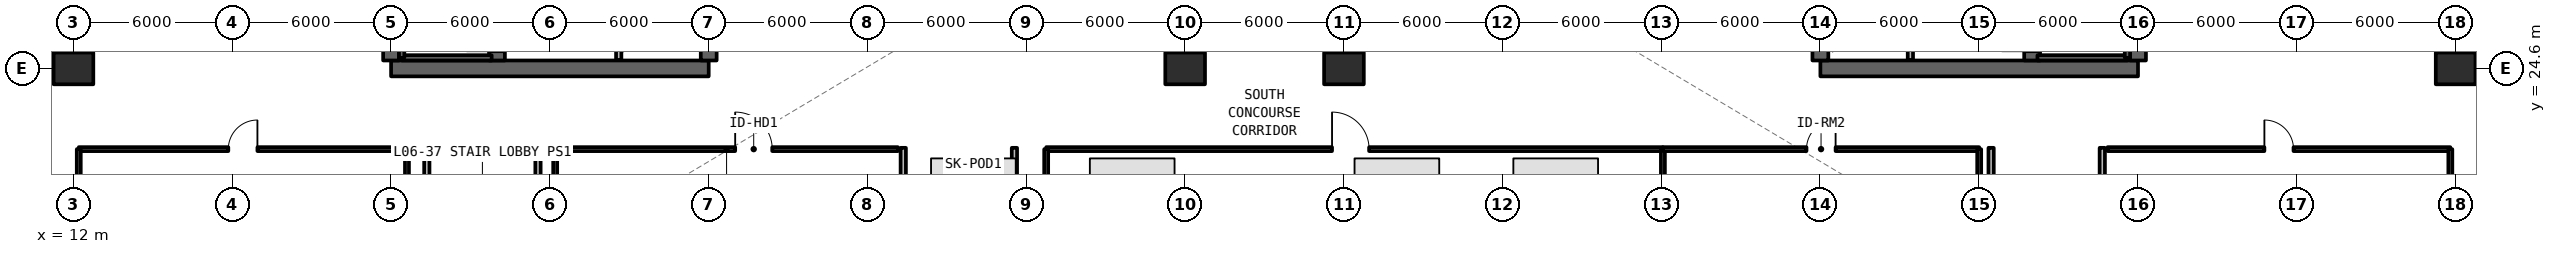
"""IFC4 building model, lengths in metres.
Left out: names, types, materials, properties, quantities, classifications, styles, units other than length and angle.
Written with IfcOpenShell. Run it as: python <this file> out.ifc"""

import sys

from ifc_helpers import new_model, si_unit, direction, frame, frame_2d, origin, origin_2d, place, context, subcontext, project, spatial, rectangle, extrude, element, fill, save


model = new_model("IFC4")
c1 = context("Model", 3, precision=1e-05, world=origin(), true_north=direction((0.0, 1.0)))
c2 = subcontext(c1, "Body", "Model", "MODEL_VIEW")
j1 = project(units=[si_unit("LENGTHUNIT", "METRE"), si_unit("PLANEANGLEUNIT", "RADIAN")], contexts=[c1])
p1 = place(None, origin())
s1 = spatial("IfcSite", under=j1, at=p1, CompositionType="ELEMENT")
p2 = place(p1, origin())
s2 = spatial("IfcBuilding", under=s1, at=p2, CompositionType="ELEMENT")
p3 = place(p2, frame((0.0, 0.0, 24.09)))
s3 = spatial("IfcBuildingStorey", under=s2, at=p3, CompositionType="ELEMENT", Elevation=24.09)
p4 = place(p3, frame((24.0, 24.6, 0.0), z_axis=(0.0, 0.0, 1.0), x_axis=(1.0, 0.0, 0.0)))
e1 = element("IfcWall", 1, at=p4, inside=s3, PredefinedType="SHEAR", context=c2, shape_type="SweptSolid", body=[
    extrude(rectangle(XDim=12.0, YDim=0.6, at=frame_2d((6.0, 0.0))), origin(), (0.0, 0.0, 1.0), 4.95),
])
p5 = place(p3, frame((24.0, 24.9, 0.0), z_axis=(0.0, 0.0, 1.0), x_axis=(0.0, 1.0, 0.0)))
e2 = element("IfcWall", 2, at=p5, inside=s3, PredefinedType="SHEAR", context=c2, shape_type="SweptSolid", body=[
    extrude(rectangle(XDim=17.4, YDim=0.6, at=frame_2d((8.7, 0.0))), origin(), (0.0, 0.0, 1.0), 4.95),
])
p6 = place(p3, frame((36.0, 24.9, 0.0), z_axis=(0.0, 0.0, 1.0), x_axis=(0.0, 1.0, 0.0)))
e3 = element("IfcWall", 3, at=p6, inside=s3, PredefinedType="SHEAR", context=c2, shape_type="SweptSolid", body=[
    extrude(rectangle(XDim=8.9, YDim=0.6, at=frame_2d((4.45, 0.0))), origin(), (0.0, 0.0, 1.0), 4.95),
])
p7 = place(p3, frame((28.0, 24.9, 0.0), z_axis=(0.0, 0.0, 1.0), x_axis=(0.0, 1.0, 0.0)))
e4 = element("IfcWall", 4, at=p7, inside=s3, PredefinedType="SHEAR", context=c2, shape_type="SweptSolid", body=[
    extrude(rectangle(XDim=17.4, YDim=0.6, at=frame_2d((8.7, 0.0))), origin(), (0.0, 0.0, 1.0), 4.95),
])
p8 = place(p7, frame((0.35, 0.0, 0.0)))
e5 = element("IfcOpeningElement", 5, at=p8, cuts=e4, PredefinedType="OPENING", context=c2, shape_type="SweptSolid", body=[
    extrude(rectangle(XDim=1.15, YDim=2.15, at=frame_2d((0.575, 1.075))), frame((0.0, 0.31, 0.0), z_axis=(0.0, -1.0, 0.0), x_axis=(1.0, 0.0, 0.0)), (0.0, 0.0, 1.0), 0.62),
])
p9 = place(p7, frame((9.55, 0.0, 0.0)))
e6 = element("IfcOpeningElement", 6, at=p9, cuts=e4, PredefinedType="OPENING", context=c2, shape_type="SweptSolid", body=[
    extrude(rectangle(XDim=1.15, YDim=2.15, at=frame_2d((0.575, 1.075))), frame((0.0, 0.31, 0.0), z_axis=(0.0, -1.0, 0.0), x_axis=(1.0, 0.0, 0.0)), (0.0, 0.0, 1.0), 0.62),
])
p10 = place(p3, frame((78.0, 24.6, 0.0), z_axis=(0.0, 0.0, 1.0), x_axis=(1.0, 0.0, 0.0)))
e7 = element("IfcWall", 7, at=p10, inside=s3, PredefinedType="SHEAR", context=c2, shape_type="SweptSolid", body=[
    extrude(rectangle(XDim=12.0, YDim=0.6, at=frame_2d((6.0, 0.0))), origin(), (0.0, 0.0, 1.0), 4.95),
])
p11 = place(p3, frame((90.0, 24.9, 0.0), z_axis=(0.0, 0.0, 1.0), x_axis=(0.0, 1.0, 0.0)))
e8 = element("IfcWall", 8, at=p11, inside=s3, PredefinedType="SHEAR", context=c2, shape_type="SweptSolid", body=[
    extrude(rectangle(XDim=17.4, YDim=0.6, at=frame_2d((8.7, 0.0))), origin(), (0.0, 0.0, 1.0), 4.95),
])
p12 = place(p3, frame((78.0, 24.9, 0.0), z_axis=(0.0, 0.0, 1.0), x_axis=(0.0, 1.0, 0.0)))
e9 = element("IfcWall", 9, at=p12, inside=s3, PredefinedType="SHEAR", context=c2, shape_type="SweptSolid", body=[
    extrude(rectangle(XDim=8.9, YDim=0.6, at=frame_2d((4.45, 0.0))), origin(), (0.0, 0.0, 1.0), 4.95),
])
p13 = place(p3, frame((86.0, 24.9, 0.0), z_axis=(0.0, 0.0, 1.0), x_axis=(0.0, 1.0, 0.0)))
e10 = element("IfcWall", 10, at=p13, inside=s3, PredefinedType="SHEAR", context=c2, shape_type="SweptSolid", body=[
    extrude(rectangle(XDim=17.4, YDim=0.6, at=frame_2d((8.7, 0.0))), origin(), (0.0, 0.0, 1.0), 4.95),
])
p14 = place(p13, frame((0.35, 0.0, 0.0)))
e11 = element("IfcOpeningElement", 11, at=p14, cuts=e10, PredefinedType="OPENING", context=c2, shape_type="SweptSolid", body=[
    extrude(rectangle(XDim=1.15, YDim=2.15, at=frame_2d((0.575, 1.075))), frame((0.0, 0.31, 0.0), z_axis=(0.0, -1.0, 0.0), x_axis=(1.0, 0.0, 0.0)), (0.0, 0.0, 1.0), 0.62),
])
p15 = place(p13, frame((9.55, 0.0, 0.0)))
e12 = element("IfcOpeningElement", 12, at=p15, cuts=e10, PredefinedType="OPENING", context=c2, shape_type="SweptSolid", body=[
    extrude(rectangle(XDim=1.15, YDim=2.15, at=frame_2d((0.575, 1.075))), frame((0.0, 0.31, 0.0), z_axis=(0.0, -1.0, 0.0), x_axis=(1.0, 0.0, 0.0)), (0.0, 0.0, 1.0), 0.62),
])
p16 = place(p3, frame((12.0, 24.6, 0.0), z_axis=(0.0, 0.0, 1.0), x_axis=(1.0, 0.0, 0.0)))
e13 = element("IfcColumn", 13, at=p16, inside=s3, PredefinedType="COLUMN", context=c2, shape_type="SweptSolid", body=[
    extrude(rectangle(XDim=1.5, YDim=1.2, at=origin_2d()), origin(), (0.0, 0.0, 1.0), 4.71),
])
for number, where, z_axis, x_axis in (
    (14, (54.0, 24.6, 0.0), (0.0, 0.0, 1.0), (1.0, 0.0, 0.0)),
    (15, (60.0, 24.6, 0.0), (0.0, 0.0, 1.0), (1.0, 0.0, 0.0)),
):
    element("IfcColumn", number, at=place(p3, frame(where, z_axis=z_axis, x_axis=x_axis)), inside=s3, PredefinedType="COLUMN", context=c2, shape_type="SweptSolid", body=[
        extrude(rectangle(XDim=1.5, YDim=1.2, at=origin_2d()), origin(), (0.0, 0.0, 1.0), 4.95),
    ])
p17 = place(p3, frame((102.0, 24.6, 0.0), z_axis=(0.0, 0.0, 1.0), x_axis=(1.0, 0.0, 0.0)))
e16 = element("IfcColumn", 16, at=p17, inside=s3, PredefinedType="COLUMN", context=c2, shape_type="SweptSolid", body=[
    extrude(rectangle(XDim=1.5, YDim=1.2, at=origin_2d()), origin(), (0.0, 0.0, 1.0), 4.71),
])
p18 = place(p3, frame((32.6, 24.92, 0.0), z_axis=(0.0, 0.0, 1.0), x_axis=(0.0, 1.0, 0.0)))
e17 = element("IfcWall", 17, at=p18, inside=s3, PredefinedType="SOLIDWALL", context=c2, shape_type="SweptSolid", body=[
    extrude(rectangle(XDim=3.58, YDim=0.2, at=frame_2d((1.79, 0.0))), origin(), (0.0, 0.0, 1.0), 3.93),
])
p19 = place(p18, frame((1.3, 0.0, 0.0)))
e18 = element("IfcOpeningElement", 18, at=p19, cuts=e17, PredefinedType="OPENING", context=c2, shape_type="SweptSolid", body=[
    extrude(rectangle(XDim=1.1, YDim=2.2, at=frame_2d((0.55, 1.1))), frame((0.0, 0.11, 0.0), z_axis=(0.0, -1.0, 0.0), x_axis=(1.0, 0.0, 0.0)), (0.0, 0.0, 1.0), 0.22),
])
p20 = place(p3, frame((81.4, 24.92, 0.0), z_axis=(0.0, 0.0, 1.0), x_axis=(0.0, 1.0, 0.0)))
e19 = element("IfcWall", 19, at=p20, inside=s3, PredefinedType="SOLIDWALL", context=c2, shape_type="SweptSolid", body=[
    extrude(rectangle(XDim=3.58, YDim=0.2, at=frame_2d((1.79, 0.0))), origin(), (0.0, 0.0, 1.0), 3.93),
])
p21 = place(p20, frame((1.3, 0.0, 0.0)))
e20 = element("IfcOpeningElement", 20, at=p21, cuts=e19, PredefinedType="OPENING", context=c2, shape_type="SweptSolid", body=[
    extrude(rectangle(XDim=1.1, YDim=2.2, at=frame_2d((0.55, 1.1))), frame((0.0, 0.11, 0.0), z_axis=(0.0, -1.0, 0.0), x_axis=(1.0, 0.0, 0.0)), (0.0, 0.0, 1.0), 0.22),
])
for number, where, z_axis, x_axis in (
    (21, (25.35, 17.0, 0.0), (0.0, 0.0, 1.0), (0.0, 1.0, 0.0)),
    (22, (29.55, 17.0, 0.0), (0.0, 0.0, 1.0), (0.0, 1.0, 0.0)),
    (23, (43.35, 17.0, 0.0), (0.0, 0.0, 1.0), (0.0, 1.0, 0.0)),
    (24, (47.55, 17.0, 0.0), (0.0, 0.0, 1.0), (0.0, 1.0, 0.0)),
    (25, (84.45, 17.0, 0.0), (0.0, 0.0, 1.0), (0.0, 1.0, 0.0)),
    (26, (88.65, 17.0, 0.0), (0.0, 0.0, 1.0), (0.0, 1.0, 0.0)),
):
    element("IfcWall", number, at=place(p3, frame(where, z_axis=z_axis, x_axis=x_axis)), inside=s3, PredefinedType="SOLIDWALL", context=c2, shape_type="SweptSolid", body=[
        extrude(rectangle(XDim=4.6, YDim=0.2, at=frame_2d((2.3, 0.0))), origin(), (0.0, 0.0, 1.0), 3.93),
    ])
p22 = place(p3, frame((30.2, 21.55, 0.0), z_axis=(0.0, 0.0, 1.0), x_axis=(1.0, 0.0, 0.0)))
e27 = element("IfcWall", 27, at=p22, inside=s3, PredefinedType="SOLIDWALL", context=c2, shape_type="SweptSolid", body=[
    extrude(rectangle(XDim=12.95, YDim=0.15, at=frame_2d((6.475, 0.0))), origin(), (0.0, 0.0, 1.0), 3.93),
])
p23 = place(p22, frame((6.8, 0.0, 0.0)))
e28 = element("IfcOpeningElement", 28, at=p23, cuts=e27, PredefinedType="OPENING", context=c2, shape_type="SweptSolid", body=[
    extrude(rectangle(XDim=1.4, YDim=2.15, at=frame_2d((0.7, 1.075))), frame((0.0, 0.085, 0.0), z_axis=(0.0, -1.0, 0.0), x_axis=(1.0, 0.0, 0.0)), (0.0, 0.0, 1.0), 0.17),
])
p24 = place(p3, frame((30.2, 5.28, 0.0), z_axis=(0.0, 0.0, 1.0), x_axis=(0.0, 1.0, 0.0)))
e29 = element("IfcWall", 29, at=p24, inside=s3, PredefinedType="SOLIDWALL", context=c2, shape_type="SweptSolid", body=[
    extrude(rectangle(XDim=16.27, YDim=0.15, at=frame_2d((8.135, 0.0))), origin(), (0.0, 0.0, 1.0), 3.687),
])
p25 = place(p3, frame((48.75, 21.55, 0.0), z_axis=(0.0, 0.0, 1.0), x_axis=(1.0, 0.0, 0.0)))
e30 = element("IfcWall", 30, at=p25, inside=s3, PredefinedType="SOLIDWALL", context=c2, shape_type="SweptSolid", body=[
    extrude(rectangle(XDim=23.3, YDim=0.15, at=frame_2d((11.65, 0.0))), origin(), (0.0, 0.0, 1.0), 3.93),
])
p26 = place(p25, frame((10.8, 0.0, 0.0)))
e31 = element("IfcOpeningElement", 31, at=p26, cuts=e30, PredefinedType="OPENING", context=c2, shape_type="SweptSolid", body=[
    extrude(rectangle(XDim=1.4, YDim=2.15, at=frame_2d((0.7, 1.075))), frame((0.0, 0.085, 0.0), z_axis=(0.0, -1.0, 0.0), x_axis=(1.0, 0.0, 0.0)), (0.0, 0.0, 1.0), 0.17),
])
p27 = place(p3, frame((48.75, 5.28, 0.0), z_axis=(0.0, 0.0, 1.0), x_axis=(0.0, 1.0, 0.0)))
e32 = element("IfcWall", 32, at=p27, inside=s3, PredefinedType="SOLIDWALL", context=c2, shape_type="SweptSolid", body=[
    extrude(rectangle(XDim=16.27, YDim=0.15, at=frame_2d((8.135, 0.0))), origin(), (0.0, 0.0, 1.0), 3.93),
])
p28 = place(p3, frame((72.05, 5.28, 0.0), z_axis=(0.0, 0.0, 1.0), x_axis=(0.0, 1.0, 0.0)))
e33 = element("IfcWall", 33, at=p28, inside=s3, PredefinedType="SOLIDWALL", context=c2, shape_type="SweptSolid", body=[
    extrude(rectangle(XDim=16.27, YDim=0.15, at=frame_2d((8.135, 0.0))), origin(), (0.0, 0.0, 1.0), 3.687),
])
p29 = place(p3, frame((72.05, 21.55, 0.0), z_axis=(0.0, 0.0, 1.0), x_axis=(1.0, 0.0, 0.0)))
e34 = element("IfcWall", 34, at=p29, inside=s3, PredefinedType="SOLIDWALL", context=c2, shape_type="SweptSolid", body=[
    extrude(rectangle(XDim=11.95, YDim=0.15, at=frame_2d((5.975, 0.0))), origin(), (0.0, 0.0, 1.0), 3.93),
])
p30 = place(p29, frame((5.425, 0.0, 0.0)))
e35 = element("IfcOpeningElement", 35, at=p30, cuts=e34, PredefinedType="OPENING", context=c2, shape_type="SweptSolid", body=[
    extrude(rectangle(XDim=1.1, YDim=2.15, at=frame_2d((0.55, 1.075))), frame((0.0, 0.085, 0.0), z_axis=(0.0, -1.0, 0.0), x_axis=(1.0, 0.0, 0.0)), (0.0, 0.0, 1.0), 0.17),
])
p31 = place(p3, frame((84.0, 5.28, 0.0), z_axis=(0.0, 0.0, 1.0), x_axis=(0.0, 1.0, 0.0)))
e36 = element("IfcWall", 36, at=p31, inside=s3, PredefinedType="SOLIDWALL", context=c2, shape_type="SweptSolid", body=[
    extrude(rectangle(XDim=16.27, YDim=0.15, at=frame_2d((8.135, 0.0))), origin(), (0.0, 0.0, 1.0), 3.687),
])
p32 = place(p3, frame((12.2, 21.55, 0.0), z_axis=(0.0, 0.0, 1.0), x_axis=(1.0, 0.0, 0.0)))
e37 = element("IfcWall", 37, at=p32, inside=s3, PredefinedType="SOLIDWALL", context=c2, shape_type="SweptSolid", body=[
    extrude(rectangle(XDim=12.4, YDim=0.15, at=frame_2d((6.2, 0.0))), origin(), (0.0, 0.0, 1.0), 3.93),
])
p33 = place(p32, frame((5.65, 0.0, 0.0)))
e38 = element("IfcOpeningElement", 38, at=p33, cuts=e37, PredefinedType="OPENING", context=c2, shape_type="SweptSolid", body=[
    extrude(rectangle(XDim=1.1, YDim=2.15, at=frame_2d((0.55, 1.075))), frame((0.0, 0.085, 0.0), z_axis=(0.0, -1.0, 0.0), x_axis=(1.0, 0.0, 0.0)), (0.0, 0.0, 1.0), 0.17),
])
for number, where, z_axis, x_axis in (
    (39, (12.2, 5.28, 0.0), (0.0, 0.0, 1.0), (0.0, 1.0, 0.0)),
    (40, (24.6, 5.28, 0.0), (0.0, 0.0, 1.0), (0.0, 1.0, 0.0)),
):
    element("IfcWall", number, at=place(p3, frame(where, z_axis=z_axis, x_axis=x_axis)), inside=s3, PredefinedType="SOLIDWALL", context=c2, shape_type="SweptSolid", body=[
        extrude(rectangle(XDim=16.27, YDim=0.15, at=frame_2d((8.135, 0.0))), origin(), (0.0, 0.0, 1.0), 3.93),
    ])
p34 = place(p3, frame((88.85, 21.55, 0.0), z_axis=(0.0, 0.0, 1.0), x_axis=(1.0, 0.0, 0.0)))
e41 = element("IfcWall", 41, at=p34, inside=s3, PredefinedType="SOLIDWALL", context=c2, shape_type="SweptSolid", body=[
    extrude(rectangle(XDim=12.95, YDim=0.15, at=frame_2d((6.475, 0.0))), origin(), (0.0, 0.0, 1.0), 3.93),
])
p35 = place(p34, frame((5.925, 0.0, 0.0)))
e42 = element("IfcOpeningElement", 42, at=p35, cuts=e41, PredefinedType="OPENING", context=c2, shape_type="SweptSolid", body=[
    extrude(rectangle(XDim=1.1, YDim=2.15, at=frame_2d((0.55, 1.075))), frame((0.0, 0.085, 0.0), z_axis=(0.0, -1.0, 0.0), x_axis=(1.0, 0.0, 0.0)), (0.0, 0.0, 1.0), 0.17),
])
p36 = place(p3, frame((101.8, 5.28, 0.0), z_axis=(0.0, 0.0, 1.0), x_axis=(0.0, 1.0, 0.0)))
e43 = element("IfcWall", 43, at=p36, inside=s3, PredefinedType="SOLIDWALL", context=c2, shape_type="SweptSolid", body=[
    extrude(rectangle(XDim=16.27, YDim=0.15, at=frame_2d((8.135, 0.0))), origin(), (0.0, 0.0, 1.0), 3.93),
])
p37 = place(p3, frame((24.4, 25.0, 0.0), z_axis=(0.0, 0.0, 1.0), x_axis=(1.0, 0.0, 0.0)))
e44 = element("IfcWall", 44, at=p37, inside=s3, PredefinedType="SOLIDWALL", context=c2, shape_type="SweptSolid", body=[
    extrude(rectangle(XDim=3.4, YDim=0.2, at=frame_2d((1.7, 0.0))), origin(), (0.0, 0.0, 1.0), 4.95),
])
p38 = place(p3, frame((24.4, 33.0, 0.0), z_axis=(0.0, 0.0, 1.0), x_axis=(0.0, -1.0, 0.0)))
e45 = element("IfcWall", 45, at=p38, inside=s3, PredefinedType="SOLIDWALL", context=c2, shape_type="SweptSolid", body=[
    extrude(rectangle(XDim=8.0, YDim=0.2, at=frame_2d((4.0, 0.0))), origin(), (0.0, 0.0, 1.0), 4.95),
])
p39 = place(p3, frame((86.2, 25.0, 0.0), z_axis=(0.0, 0.0, 1.0), x_axis=(1.0, 0.0, 0.0)))
e46 = element("IfcWall", 46, at=p39, inside=s3, PredefinedType="SOLIDWALL", context=c2, shape_type="SweptSolid", body=[
    extrude(rectangle(XDim=3.4, YDim=0.2, at=frame_2d((1.7, 0.0))), origin(), (0.0, 0.0, 1.0), 4.95),
])
p40 = place(p3, frame((89.6, 25.0, 0.0), z_axis=(0.0, 0.0, 1.0), x_axis=(0.0, 1.0, 0.0)))
e47 = element("IfcWall", 47, at=p40, inside=s3, PredefinedType="SOLIDWALL", context=c2, shape_type="SweptSolid", body=[
    extrude(rectangle(XDim=8.0, YDim=0.2, at=frame_2d((4.0, 0.0))), origin(), (0.0, 0.0, 1.0), 4.95),
])
p41 = place(p3, frame((0.0, 0.0, -0.35)))
p42 = place(p41, frame((46.0, 20.0, 0.0)))
p43 = place(p42, frame((0.0, 0.0, 0.3)))
e48 = element("IfcWindow", 48, at=p43, inside=s3, PartitioningType="SINGLE_PANEL", PredefinedType="SKYLIGHT", context=c2, shape_type="SweptSolid", body=[
    extrude(rectangle(XDim=3.2, YDim=2.4, at=origin_2d()), origin(), (0.0, 0.0, 1.0), 0.05),
])
p44 = place(p41, frame((52.0, 20.0, 0.0)))
p45 = place(p44, frame((0.0, 0.0, 0.3)))
e49 = element("IfcWindow", 49, at=p45, inside=s3, PartitioningType="SINGLE_PANEL", PredefinedType="SKYLIGHT", context=c2, shape_type="SweptSolid", body=[
    extrude(rectangle(XDim=3.2, YDim=2.4, at=origin_2d()), origin(), (0.0, 0.0, 1.0), 0.05),
])
p46 = place(p41, frame((62.0, 20.0, 0.0)))
p47 = place(p46, frame((0.0, 0.0, 0.3)))
e50 = element("IfcWindow", 50, at=p47, inside=s3, PartitioningType="SINGLE_PANEL", PredefinedType="SKYLIGHT", context=c2, shape_type="SweptSolid", body=[
    extrude(rectangle(XDim=3.2, YDim=2.4, at=origin_2d()), origin(), (0.0, 0.0, 1.0), 0.05),
])
p48 = place(p41, frame((68.0, 20.0, 0.0)))
p49 = place(p48, frame((0.0, 0.0, 0.3)))
e51 = element("IfcWindow", 51, at=p49, inside=s3, PartitioningType="SINGLE_PANEL", PredefinedType="SKYLIGHT", context=c2, shape_type="SweptSolid", body=[
    extrude(rectangle(XDim=3.2, YDim=2.4, at=origin_2d()), origin(), (0.0, 0.0, 1.0), 0.05),
])
p50 = place(p23, origin())
e52 = element("IfcDoor", 52, at=p50, inside=s3, OperationType="SINGLE_SWING_RIGHT", PredefinedType="DOOR", context=c2, shape_type="SweptSolid", body=[
    extrude(rectangle(XDim=1.4, YDim=2.15, at=frame_2d((0.7, 1.075))), frame((0.0, 0.025, 0.0), z_axis=(0.0, -1.0, 0.0), x_axis=(1.0, 0.0, 0.0)), (0.0, 0.0, 1.0), 0.05),
])
fill(e28, e52)
p51 = place(p26, origin())
e53 = element("IfcDoor", 53, at=p51, inside=s3, OperationType="SINGLE_SWING_LEFT", PredefinedType="DOOR", context=c2, shape_type="SweptSolid", body=[
    extrude(rectangle(XDim=1.4, YDim=2.15, at=frame_2d((0.7, 1.075))), frame((0.0, 0.025, 0.0), z_axis=(0.0, -1.0, 0.0), x_axis=(1.0, 0.0, 0.0)), (0.0, 0.0, 1.0), 0.05),
])
fill(e31, e53)
p52 = place(p30, origin())
e54 = element("IfcDoor", 54, at=p52, inside=s3, OperationType="SINGLE_SWING_RIGHT", PredefinedType="DOOR", context=c2, shape_type="SweptSolid", body=[
    extrude(rectangle(XDim=1.1, YDim=2.15, at=frame_2d((0.55, 1.075))), frame((0.0, 0.025, 0.0), z_axis=(0.0, -1.0, 0.0), x_axis=(1.0, 0.0, 0.0)), (0.0, 0.0, 1.0), 0.05),
])
fill(e35, e54)
p53 = place(p33, origin())
e55 = element("IfcDoor", 55, at=p53, inside=s3, OperationType="SINGLE_SWING_RIGHT", PredefinedType="DOOR", context=c2, shape_type="SweptSolid", body=[
    extrude(rectangle(XDim=1.1, YDim=2.15, at=frame_2d((0.55, 1.075))), frame((0.0, 0.025, 0.0), z_axis=(0.0, -1.0, 0.0), x_axis=(1.0, 0.0, 0.0)), (0.0, 0.0, 1.0), 0.05),
])
fill(e38, e55)
p54 = place(p35, origin())
e56 = element("IfcDoor", 56, at=p54, inside=s3, OperationType="SINGLE_SWING_LEFT", PredefinedType="DOOR", context=c2, shape_type="SweptSolid", body=[
    extrude(rectangle(XDim=1.1, YDim=2.15, at=frame_2d((0.55, 1.075))), frame((0.0, 0.025, 0.0), z_axis=(0.0, -1.0, 0.0), x_axis=(1.0, 0.0, 0.0)), (0.0, 0.0, 1.0), 0.05),
])
fill(e42, e56)
save(model, sys.argv[1])
